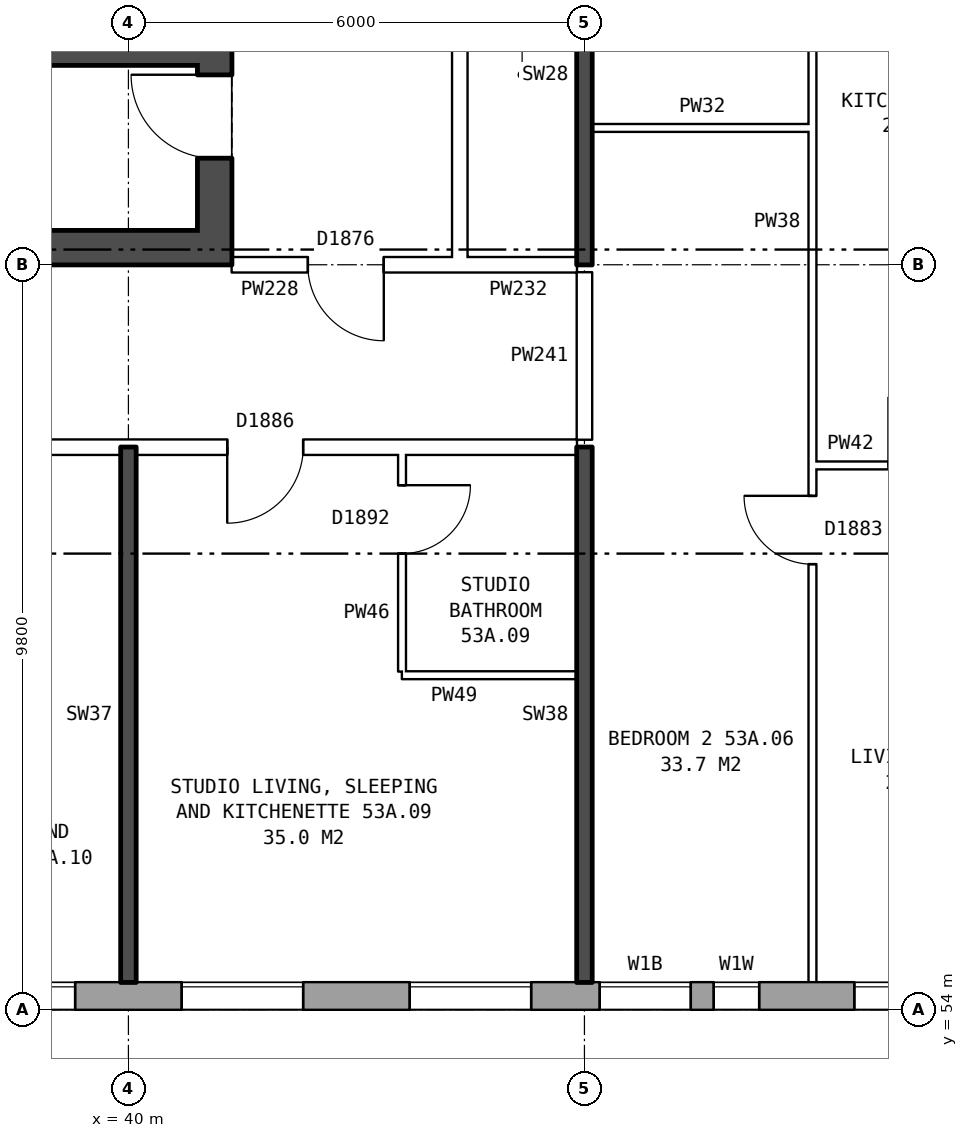
"""IFC4 building model, lengths in metres.
Left out: names, types, materials, properties, quantities, classifications, styles, units other than length and angle.
Written with IfcOpenShell. Run it as: python <this file> out.ifc"""

import sys

from ifc_helpers import new_model, si_unit, direction, frame, frame_2d, origin, place, context, subcontext, project, spatial, rectangle, extrude, element, fill, save


model = new_model("IFC4")
c1 = context("Model", 3, precision=1e-05, world=origin(), true_north=direction((0.0, 1.0)))
c2 = subcontext(c1, "Body", "Model", "MODEL_VIEW")
j1 = project(units=[si_unit("LENGTHUNIT", "METRE"), si_unit("PLANEANGLEUNIT", "RADIAN")], contexts=[c1])
p1 = place(None, origin())
s1 = spatial("IfcSite", under=j1, at=p1, CompositionType="ELEMENT")
p2 = place(p1, origin())
s2 = spatial("IfcBuilding", under=s1, at=p2, CompositionType="ELEMENT")
p3 = place(p2, frame((0.0, 0.0, 188.2)))
s3 = spatial("IfcBuildingStorey", under=s2, at=p3, CompositionType="ELEMENT", Elevation=188.2)
p4 = place(p3, frame((33.325, 54.18, 0.0), z_axis=(0.0, 0.0, 1.0), x_axis=(1.0, 0.0, 0.0)))
e1 = element("IfcWall", 1, at=p4, inside=s3, PredefinedType="STANDARD", context=c2, shape_type="SweptSolid", body=[
    extrude(rectangle(XDim=39.601, YDim=0.36, at=frame_2d((19.8, 0.0))), origin(), (0.0, 0.0, 1.0), 2.85),
])
p5 = place(p4, frame((1.375, 0.0, 0.8)))
e2 = element("IfcOpeningElement", 2, at=p5, cuts=e1, PredefinedType="OPENING", context=c2, shape_type="SweptSolid", body=[
    extrude(rectangle(XDim=1.6, YDim=1.8, at=frame_2d((0.8, 0.9))), frame((0.0, 0.19, 0.0), z_axis=(0.0, -1.0, 0.0), x_axis=(1.0, 0.0, 0.0)), (0.0, 0.0, 1.0), 0.38),
])
p6 = place(p4, frame((4.375, 0.0, 0.8)))
e3 = element("IfcOpeningElement", 3, at=p6, cuts=e1, PredefinedType="OPENING", context=c2, shape_type="SweptSolid", body=[
    extrude(rectangle(XDim=1.6, YDim=1.8, at=frame_2d((0.8, 0.9))), frame((0.0, 0.19, 0.0), z_axis=(0.0, -1.0, 0.0), x_axis=(1.0, 0.0, 0.0)), (0.0, 0.0, 1.0), 0.38),
])
p7 = place(p4, frame((7.375, 0.0, 0.8)))
e4 = element("IfcOpeningElement", 4, at=p7, cuts=e1, PredefinedType="OPENING", context=c2, shape_type="SweptSolid", body=[
    extrude(rectangle(XDim=1.6, YDim=1.8, at=frame_2d((0.8, 0.9))), frame((0.0, 0.19, 0.0), z_axis=(0.0, -1.0, 0.0), x_axis=(1.0, 0.0, 0.0)), (0.0, 0.0, 1.0), 0.38),
])
p8 = place(p4, frame((10.375, 0.0, 0.8)))
e5 = element("IfcOpeningElement", 5, at=p8, cuts=e1, PredefinedType="OPENING", context=c2, shape_type="SweptSolid", body=[
    extrude(rectangle(XDim=1.6, YDim=1.8, at=frame_2d((0.8, 0.9))), frame((0.0, 0.19, 0.0), z_axis=(0.0, -1.0, 0.0), x_axis=(1.0, 0.0, 0.0)), (0.0, 0.0, 1.0), 0.38),
])
p9 = place(p4, frame((12.875, 0.0, 0.8)))
e6 = element("IfcOpeningElement", 6, at=p9, cuts=e1, PredefinedType="OPENING", context=c2, shape_type="SweptSolid", body=[
    extrude(rectangle(XDim=1.2, YDim=1.8, at=frame_2d((0.6, 0.9))), frame((0.0, 0.19, 0.0), z_axis=(0.0, -1.0, 0.0), x_axis=(1.0, 0.0, 0.0)), (0.0, 0.0, 1.0), 0.38),
])
p10 = place(p4, frame((16.225, 0.0, 0.8)))
e7 = element("IfcOpeningElement", 7, at=p10, cuts=e1, PredefinedType="OPENING", context=c2, shape_type="SweptSolid", body=[
    extrude(rectangle(XDim=0.6, YDim=0.9, at=frame_2d((0.3, 0.45))), frame((0.0, 0.19, 0.0), z_axis=(0.0, -1.0, 0.0), x_axis=(1.0, 0.0, 0.0)), (0.0, 0.0, 1.0), 0.38),
])
p11 = place(p4, frame((19.375, 0.0, 0.8)))
e8 = element("IfcOpeningElement", 8, at=p11, cuts=e1, PredefinedType="OPENING", context=c2, shape_type="SweptSolid", body=[
    extrude(rectangle(XDim=1.6, YDim=1.8, at=frame_2d((0.8, 0.9))), frame((0.0, 0.19, 0.0), z_axis=(0.0, -1.0, 0.0), x_axis=(1.0, 0.0, 0.0)), (0.0, 0.0, 1.0), 0.38),
])
p12 = place(p4, frame((21.875, 0.0, 0.15)))
e9 = element("IfcOpeningElement", 9, at=p12, cuts=e1, PredefinedType="OPENING", context=c2, shape_type="SweptSolid", body=[
    extrude(rectangle(XDim=1.2, YDim=1.8, at=frame_2d((0.6, 0.9))), frame((0.0, 0.19, 0.0), z_axis=(0.0, -1.0, 0.0), x_axis=(1.0, 0.0, 0.0)), (0.0, 0.0, 1.0), 0.38),
])
p13 = place(p4, frame((25.375, 0.0, 0.8)))
e10 = element("IfcOpeningElement", 10, at=p13, cuts=e1, PredefinedType="OPENING", context=c2, shape_type="SweptSolid", body=[
    extrude(rectangle(XDim=1.6, YDim=1.8, at=frame_2d((0.8, 0.9))), frame((0.0, 0.19, 0.0), z_axis=(0.0, -1.0, 0.0), x_axis=(1.0, 0.0, 0.0)), (0.0, 0.0, 1.0), 0.38),
])
p14 = place(p4, frame((28.375, 0.0, 0.8)))
e11 = element("IfcOpeningElement", 11, at=p14, cuts=e1, PredefinedType="OPENING", context=c2, shape_type="SweptSolid", body=[
    extrude(rectangle(XDim=1.6, YDim=1.8, at=frame_2d((0.8, 0.9))), frame((0.0, 0.19, 0.0), z_axis=(0.0, -1.0, 0.0), x_axis=(1.0, 0.0, 0.0)), (0.0, 0.0, 1.0), 0.38),
])
p15 = place(p4, frame((31.375, 0.0, 0.8)))
e12 = element("IfcOpeningElement", 12, at=p15, cuts=e1, PredefinedType="OPENING", context=c2, shape_type="SweptSolid", body=[
    extrude(rectangle(XDim=1.6, YDim=1.8, at=frame_2d((0.8, 0.9))), frame((0.0, 0.19, 0.0), z_axis=(0.0, -1.0, 0.0), x_axis=(1.0, 0.0, 0.0)), (0.0, 0.0, 1.0), 0.38),
])
p16 = place(p4, frame((34.375, 0.0, 0.8)))
e13 = element("IfcOpeningElement", 13, at=p16, cuts=e1, PredefinedType="OPENING", context=c2, shape_type="SweptSolid", body=[
    extrude(rectangle(XDim=1.6, YDim=1.8, at=frame_2d((0.8, 0.9))), frame((0.0, 0.19, 0.0), z_axis=(0.0, -1.0, 0.0), x_axis=(1.0, 0.0, 0.0)), (0.0, 0.0, 1.0), 0.38),
])
p17 = place(p4, frame((37.375, 0.0, 0.8)))
e14 = element("IfcOpeningElement", 14, at=p17, cuts=e1, PredefinedType="OPENING", context=c2, shape_type="SweptSolid", body=[
    extrude(rectangle(XDim=1.6, YDim=1.8, at=frame_2d((0.8, 0.9))), frame((0.0, 0.19, 0.0), z_axis=(0.0, -1.0, 0.0), x_axis=(1.0, 0.0, 0.0)), (0.0, 0.0, 1.0), 0.38),
])
p18 = place(p4, frame((14.375, 0.0, 1.6)))
e15 = element("IfcOpeningElement", 15, at=p18, cuts=e1, PredefinedType="OPENING", context=c2, shape_type="SweptSolid", body=[
    extrude(rectangle(XDim=0.6, YDim=0.9, at=frame_2d((0.3, 0.45))), frame((0.0, 0.19, 0.0), z_axis=(0.0, -1.0, 0.0), x_axis=(1.0, 0.0, 0.0)), (0.0, 0.0, 1.0), 0.38),
])
p19 = place(p4, frame((17.125, 0.0, 0.8)))
e16 = element("IfcOpeningElement", 16, at=p19, cuts=e1, PredefinedType="OPENING", context=c2, shape_type="SweptSolid", body=[
    extrude(rectangle(XDim=1.2, YDim=1.8, at=frame_2d((0.6, 0.9))), frame((0.0, 0.19, 0.0), z_axis=(0.0, -1.0, 0.0), x_axis=(1.0, 0.0, 0.0)), (0.0, 0.0, 1.0), 0.38),
])
p20 = place(p4, frame((23.375, 0.0, 0.15)))
e17 = element("IfcOpeningElement", 17, at=p20, cuts=e1, PredefinedType="OPENING", context=c2, shape_type="SweptSolid", body=[
    extrude(rectangle(XDim=0.6, YDim=0.9, at=frame_2d((0.3, 0.45))), frame((0.0, 0.19, 0.0), z_axis=(0.0, -1.0, 0.0), x_axis=(1.0, 0.0, 0.0)), (0.0, 0.0, 1.0), 0.38),
])
p21 = place(p3, frame((41.135, 76.2, 0.0), z_axis=(0.0, 0.0, 1.0), x_axis=(0.0, -1.0, 0.0)))
e18 = element("IfcWall", 18, at=p21, inside=s3, PredefinedType="SHEAR", context=c2, shape_type="SweptSolid", body=[
    extrude(rectangle(XDim=12.4, YDim=0.45, at=frame_2d((6.2, 0.0))), origin(), (0.0, 0.0, 1.0), 2.85),
])
p22 = place(p21, frame((1.325, 0.0, 0.0)))
e19 = element("IfcOpeningElement", 19, at=p22, cuts=e18, PredefinedType="OPENING", context=c2, shape_type="SweptSolid", body=[
    extrude(rectangle(XDim=1.1, YDim=2.1, at=frame_2d((0.55, 1.05))), frame((0.0, 0.235, 0.0), z_axis=(0.0, -1.0, 0.0), x_axis=(1.0, 0.0, 0.0)), (0.0, 0.0, 1.0), 0.47),
])
p23 = place(p21, frame((4.575, 0.0, 0.0)))
e20 = element("IfcOpeningElement", 20, at=p23, cuts=e18, PredefinedType="OPENING", context=c2, shape_type="SweptSolid", body=[
    extrude(rectangle(XDim=0.85, YDim=2.1, at=frame_2d((0.425, 1.05))), frame((0.0, 0.235, 0.0), z_axis=(0.0, -1.0, 0.0), x_axis=(1.0, 0.0, 0.0)), (0.0, 0.0, 1.0), 0.47),
])
p24 = place(p21, frame((7.825, 0.0, 0.0)))
e21 = element("IfcOpeningElement", 21, at=p24, cuts=e18, PredefinedType="OPENING", context=c2, shape_type="SweptSolid", body=[
    extrude(rectangle(XDim=0.85, YDim=2.1, at=frame_2d((0.425, 1.05))), frame((0.0, 0.235, 0.0), z_axis=(0.0, -1.0, 0.0), x_axis=(1.0, 0.0, 0.0)), (0.0, 0.0, 1.0), 0.47),
])
p25 = place(p21, frame((9.9, 0.0, 0.0)))
e22 = element("IfcOpeningElement", 22, at=p25, cuts=e18, PredefinedType="OPENING", context=c2, shape_type="SweptSolid", body=[
    extrude(rectangle(XDim=1.1, YDim=2.1, at=frame_2d((0.55, 1.05))), frame((0.0, 0.235, 0.0), z_axis=(0.0, -1.0, 0.0), x_axis=(1.0, 0.0, 0.0)), (0.0, 0.0, 1.0), 0.47),
])
p26 = place(p3, frame((40.91, 64.025, 0.0), z_axis=(0.0, 0.0, 1.0), x_axis=(-1.0, 0.0, 0.0)))
e23 = element("IfcWall", 23, at=p26, inside=s3, PredefinedType="SHEAR", context=c2, shape_type="SweptSolid", body=[
    extrude(rectangle(XDim=8.1, YDim=0.45, at=frame_2d((4.05, 0.0))), origin(), (0.0, 0.0, 1.0), 2.85),
])
p27 = place(p3, frame((40.91, 66.55, 0.0), z_axis=(0.0, 0.0, 1.0), x_axis=(-1.0, 0.0, 0.0)))
e24 = element("IfcWall", 24, at=p27, inside=s3, PredefinedType="SHEAR", context=c2, shape_type="SweptSolid", body=[
    extrude(rectangle(XDim=2.475, YDim=0.25, at=frame_2d((1.237, 0.0))), origin(), (0.0, 0.0, 1.0), 2.85),
])
p28 = place(p3, frame((44.36, 63.9, 0.0), z_axis=(0.0, 0.0, 1.0), x_axis=(0.0, 1.0, 0.0)))
e25 = element("IfcWall", 25, at=p28, inside=s3, PredefinedType="PARTITIONING", context=c2, shape_type="SweptSolid", body=[
    extrude(rectangle(XDim=12.2, YDim=0.2, at=frame_2d((6.1, 0.0))), origin(), (0.0, 0.0, 1.0), 2.85),
])
p29 = place(p28, frame((5.1, 0.0, 0.0)))
e26 = element("IfcOpeningElement", 26, at=p29, cuts=e25, PredefinedType="OPENING", context=c2, shape_type="SweptSolid", body=[
    extrude(rectangle(XDim=2.0, YDim=2.1, at=frame_2d((1.0, 1.05))), frame((0.0, 0.11, 0.0), z_axis=(0.0, -1.0, 0.0), x_axis=(1.0, 0.0, 0.0)), (0.0, 0.0, 1.0), 0.22),
])
p30 = place(p3, frame((43.6, 58.4, 0.0), z_axis=(0.0, 0.0, 1.0), x_axis=(1.0, 0.0, 0.0)))
e27 = element("IfcWall", 27, at=p30, inside=s3, PredefinedType="PARTITIONING", context=c2, shape_type="SweptSolid", body=[
    extrude(rectangle(XDim=2.3, YDim=0.1, at=frame_2d((1.15, 0.0))), origin(), (0.0, 0.0, 1.0), 2.85),
])
p31 = place(p3, frame((49.0, 61.16, 0.0), z_axis=(0.0, 0.0, 1.0), x_axis=(1.0, 0.0, 0.0)))
e28 = element("IfcWall", 28, at=p31, inside=s3, PredefinedType="PARTITIONING", context=c2, shape_type="SweptSolid", body=[
    extrude(rectangle(XDim=2.9, YDim=0.1, at=frame_2d((1.45, 0.0))), origin(), (0.0, 0.0, 1.0), 2.85),
])
p32 = place(p31, frame((1.0, 0.0, 0.0)))
e29 = element("IfcOpeningElement", 29, at=p32, cuts=e28, PredefinedType="OPENING", context=c2, shape_type="SweptSolid", body=[
    extrude(rectangle(XDim=0.9, YDim=2.1, at=frame_2d((0.45, 1.05))), frame((0.0, 0.06, 0.0), z_axis=(0.0, -1.0, 0.0), x_axis=(1.0, 0.0, 0.0)), (0.0, 0.0, 1.0), 0.12),
])
p33 = place(p3, frame((30.61, 61.4, 0.0), z_axis=(0.0, 0.0, 1.0), x_axis=(1.0, 0.0, 0.0)))
e30 = element("IfcWall", 30, at=p33, inside=s3, PredefinedType="PARTITIONING", context=c2, shape_type="SweptSolid", body=[
    extrude(rectangle(XDim=15.29, YDim=0.2, at=frame_2d((7.645, 0.0))), origin(), (0.0, 0.0, 1.0), 2.85),
])
p34 = place(p33, frame((10.69, 0.0, 0.0)))
e31 = element("IfcOpeningElement", 31, at=p34, cuts=e30, PredefinedType="OPENING", context=c2, shape_type="SweptSolid", body=[
    extrude(rectangle(XDim=1.0, YDim=2.1, at=frame_2d((0.5, 1.05))), frame((0.0, 0.11, 0.0), z_axis=(0.0, -1.0, 0.0), x_axis=(1.0, 0.0, 0.0)), (0.0, 0.0, 1.0), 0.22),
])
p35 = place(p33, frame((5.89, 0.0, 0.0)))
e32 = element("IfcOpeningElement", 32, at=p35, cuts=e30, PredefinedType="OPENING", context=c2, shape_type="SweptSolid", body=[
    extrude(rectangle(XDim=1.0, YDim=2.1, at=frame_2d((0.5, 1.05))), frame((0.0, 0.11, 0.0), z_axis=(0.0, -1.0, 0.0), x_axis=(1.0, 0.0, 0.0)), (0.0, 0.0, 1.0), 0.22),
])
p36 = place(p3, frame((41.36, 63.8, 0.0), z_axis=(0.0, 0.0, 1.0), x_axis=(1.0, 0.0, 0.0)))
e33 = element("IfcWall", 33, at=p36, inside=s3, PredefinedType="PARTITIONING", context=c2, shape_type="SweptSolid", body=[
    extrude(rectangle(XDim=3.0, YDim=0.2, at=frame_2d((1.5, 0.0))), origin(), (0.0, 0.0, 1.0), 2.85),
])
p37 = place(p36, frame((1.0, 0.0, 0.0)))
e34 = element("IfcOpeningElement", 34, at=p37, cuts=e33, PredefinedType="OPENING", context=c2, shape_type="SweptSolid", body=[
    extrude(rectangle(XDim=1.0, YDim=2.1, at=frame_2d((0.5, 1.05))), frame((0.0, 0.11, 0.0), z_axis=(0.0, -1.0, 0.0), x_axis=(1.0, 0.0, 0.0)), (0.0, 0.0, 1.0), 0.22),
])
p38 = place(p3, frame((44.36, 63.8, 0.0), z_axis=(0.0, 0.0, 1.0), x_axis=(1.0, 0.0, 0.0)))
e35 = element("IfcWall", 35, at=p38, inside=s3, PredefinedType="PARTITIONING", context=c2, shape_type="SweptSolid", body=[
    extrude(rectangle(XDim=1.54, YDim=0.2, at=frame_2d((0.77, 0.0))), origin(), (0.0, 0.0, 1.0), 2.85),
])
p39 = place(p3, frame((46.1, 65.6, 0.0), z_axis=(0.0, 0.0, 1.0), x_axis=(1.0, 0.0, 0.0)))
e36 = element("IfcWall", 36, at=p39, inside=s3, PredefinedType="PARTITIONING", context=c2, shape_type="SweptSolid", body=[
    extrude(rectangle(XDim=2.9, YDim=0.1, at=frame_2d((1.45, 0.0))), origin(), (0.0, 0.0, 1.0), 2.85),
])
p40 = place(p3, frame((40.0, 54.36, 0.0), z_axis=(0.0, 0.0, 1.0), x_axis=(0.0, 1.0, 0.0)))
e37 = element("IfcWall", 37, at=p40, inside=s3, PredefinedType="SOLIDWALL", context=c2, shape_type="SweptSolid", body=[
    extrude(rectangle(XDim=7.04, YDim=0.2, at=frame_2d((3.52, 0.0))), origin(), (0.0, 0.0, 1.0), 2.85),
])
p41 = place(p3, frame((43.6, 58.45, 0.0), z_axis=(0.0, 0.0, 1.0), x_axis=(0.0, 1.0, 0.0)))
e38 = element("IfcWall", 38, at=p41, inside=s3, PredefinedType="PARTITIONING", context=c2, shape_type="SweptSolid", body=[
    extrude(rectangle(XDim=2.85, YDim=0.1, at=frame_2d((1.425, 0.0))), origin(), (0.0, 0.0, 1.0), 2.85),
])
p42 = place(p41, frame((1.55, 0.0, 0.0)))
e39 = element("IfcOpeningElement", 39, at=p42, cuts=e38, PredefinedType="OPENING", context=c2, shape_type="SweptSolid", body=[
    extrude(rectangle(XDim=0.9, YDim=2.1, at=frame_2d((0.45, 1.05))), frame((0.0, 0.06, 0.0), z_axis=(0.0, -1.0, 0.0), x_axis=(1.0, 0.0, 0.0)), (0.0, 0.0, 1.0), 0.12),
])
p43 = place(p3, frame((46.0, 54.36, 0.0), z_axis=(0.0, 0.0, 1.0), x_axis=(0.0, 1.0, 0.0)))
e40 = element("IfcWall", 40, at=p43, inside=s3, PredefinedType="SOLIDWALL", context=c2, shape_type="SweptSolid", body=[
    extrude(rectangle(XDim=7.04, YDim=0.2, at=frame_2d((3.52, 0.0))), origin(), (0.0, 0.0, 1.0), 2.85),
])
p44 = place(p3, frame((46.0, 61.5, 0.0), z_axis=(0.0, 0.0, 1.0), x_axis=(0.0, 1.0, 0.0)))
e41 = element("IfcWall", 41, at=p44, inside=s3, PredefinedType="PARTITIONING", context=c2, shape_type="SweptSolid", body=[
    extrude(rectangle(XDim=2.2, YDim=0.2, at=frame_2d((1.1, 0.0))), origin(), (0.0, 0.0, 1.0), 2.85),
])
p45 = place(p3, frame((46.0, 63.8, 0.0), z_axis=(0.0, 0.0, 1.0), x_axis=(0.0, 1.0, 0.0)))
e42 = element("IfcWall", 42, at=p45, inside=s3, PredefinedType="SOLIDWALL", context=c2, shape_type="SweptSolid", body=[
    extrude(rectangle(XDim=5.0, YDim=0.2, at=frame_2d((2.5, 0.0))), origin(), (0.0, 0.0, 1.0), 2.85),
])
p46 = place(p3, frame((49.0, 54.36, 0.0), z_axis=(0.0, 0.0, 1.0), x_axis=(0.0, 1.0, 0.0)))
e43 = element("IfcWall", 43, at=p46, inside=s3, PredefinedType="PARTITIONING", context=c2, shape_type="SweptSolid", body=[
    extrude(rectangle(XDim=14.34, YDim=0.1, at=frame_2d((7.17, 0.0))), origin(), (0.0, 0.0, 1.0), 2.85),
])
p47 = place(p46, frame((5.5, 0.0, 0.0)))
e44 = element("IfcOpeningElement", 44, at=p47, cuts=e43, PredefinedType="OPENING", context=c2, shape_type="SweptSolid", body=[
    extrude(rectangle(XDim=0.9, YDim=2.1, at=frame_2d((0.45, 1.05))), frame((0.0, 0.06, 0.0), z_axis=(0.0, -1.0, 0.0), x_axis=(1.0, 0.0, 0.0)), (0.0, 0.0, 1.0), 0.12),
])
p48 = place(p46, frame((13.04, 0.0, 0.0)))
e45 = element("IfcOpeningElement", 45, at=p48, cuts=e43, PredefinedType="OPENING", context=c2, shape_type="SweptSolid", body=[
    extrude(rectangle(XDim=0.9, YDim=2.1, at=frame_2d((0.45, 1.05))), frame((0.0, 0.06, 0.0), z_axis=(0.0, -1.0, 0.0), x_axis=(1.0, 0.0, 0.0)), (0.0, 0.0, 1.0), 0.12),
])
p49 = place(p6, origin())
e46 = element("IfcWindow", 46, at=p49, inside=s3, PartitioningType="SINGLE_PANEL", PredefinedType="WINDOW", context=c2, shape_type="SweptSolid", body=[
    extrude(rectangle(XDim=1.6, YDim=1.8, at=frame_2d((0.8, 0.9))), frame((0.0, 0.15, 0.0), z_axis=(0.0, -1.0, 0.0), x_axis=(1.0, 0.0, 0.0)), (0.0, 0.0, 1.0), 0.06),
])
fill(e3, e46)
p50 = place(p7, origin())
e47 = element("IfcWindow", 47, at=p50, inside=s3, PartitioningType="SINGLE_PANEL", PredefinedType="WINDOW", context=c2, shape_type="SweptSolid", body=[
    extrude(rectangle(XDim=1.6, YDim=1.8, at=frame_2d((0.8, 0.9))), frame((0.0, 0.15, 0.0), z_axis=(0.0, -1.0, 0.0), x_axis=(1.0, 0.0, 0.0)), (0.0, 0.0, 1.0), 0.06),
])
fill(e4, e47)
p51 = place(p8, origin())
e48 = element("IfcWindow", 48, at=p51, inside=s3, PartitioningType="SINGLE_PANEL", PredefinedType="WINDOW", context=c2, shape_type="SweptSolid", body=[
    extrude(rectangle(XDim=1.6, YDim=1.8, at=frame_2d((0.8, 0.9))), frame((0.0, 0.15, 0.0), z_axis=(0.0, -1.0, 0.0), x_axis=(1.0, 0.0, 0.0)), (0.0, 0.0, 1.0), 0.06),
])
fill(e5, e48)
p52 = place(p9, origin())
e49 = element("IfcWindow", 49, at=p52, inside=s3, PartitioningType="SINGLE_PANEL", PredefinedType="WINDOW", context=c2, shape_type="SweptSolid", body=[
    extrude(rectangle(XDim=1.2, YDim=1.8, at=frame_2d((0.6, 0.9))), frame((0.0, 0.15, 0.0), z_axis=(0.0, -1.0, 0.0), x_axis=(1.0, 0.0, 0.0)), (0.0, 0.0, 1.0), 0.06),
])
fill(e6, e49)
p53 = place(p10, origin())
e50 = element("IfcWindow", 50, at=p53, inside=s3, PartitioningType="SINGLE_PANEL", PredefinedType="WINDOW", context=c2, shape_type="SweptSolid", body=[
    extrude(rectangle(XDim=0.6, YDim=0.9, at=frame_2d((0.3, 0.45))), frame((0.0, 0.15, 0.0), z_axis=(0.0, -1.0, 0.0), x_axis=(1.0, 0.0, 0.0)), (0.0, 0.0, 1.0), 0.06),
])
fill(e7, e50)
p54 = place(p25, frame((1.1, 0.0, 0.0), z_axis=(0.0, 0.0, 1.0), x_axis=(-1.0, 0.0, 0.0)))
e51 = element("IfcDoor", 51, at=p54, inside=s3, OperationType="SINGLE_SWING_RIGHT", PredefinedType="DOOR", context=c2, shape_type="SweptSolid", body=[
    extrude(rectangle(XDim=1.1, YDim=2.1, at=frame_2d((0.55, 1.05))), frame((0.0, 0.21, 0.0), z_axis=(0.0, -1.0, 0.0), x_axis=(1.0, 0.0, 0.0)), (0.0, 0.0, 1.0), 0.05),
])
fill(e22, e51)
p55 = place(p37, frame((1.0, 0.0, 0.0), z_axis=(0.0, 0.0, 1.0), x_axis=(-1.0, 0.0, 0.0)))
e52 = element("IfcDoor", 52, at=p55, inside=s3, OperationType="SINGLE_SWING_LEFT", PredefinedType="DOOR", context=c2, shape_type="SweptSolid", body=[
    extrude(rectangle(XDim=1.0, YDim=2.1, at=frame_2d((0.5, 1.05))), frame((0.0, 0.025, 0.0), z_axis=(0.0, -1.0, 0.0), x_axis=(1.0, 0.0, 0.0)), (0.0, 0.0, 1.0), 0.05),
])
fill(e34, e52)
p56 = place(p47, origin())
e53 = element("IfcDoor", 53, at=p56, inside=s3, OperationType="SINGLE_SWING_RIGHT", PredefinedType="DOOR", context=c2, shape_type="SweptSolid", body=[
    extrude(rectangle(XDim=0.9, YDim=2.1, at=frame_2d((0.45, 1.05))), frame((0.0, 0.025, 0.0), z_axis=(0.0, -1.0, 0.0), x_axis=(1.0, 0.0, 0.0)), (0.0, 0.0, 1.0), 0.05),
])
fill(e44, e53)
p57 = place(p34, frame((1.0, 0.0, 0.0), z_axis=(0.0, 0.0, 1.0), x_axis=(-1.0, 0.0, 0.0)))
e54 = element("IfcDoor", 54, at=p57, inside=s3, OperationType="SINGLE_SWING_RIGHT", PredefinedType="DOOR", context=c2, shape_type="SweptSolid", body=[
    extrude(rectangle(XDim=1.0, YDim=2.1, at=frame_2d((0.5, 1.05))), frame((0.0, 0.025, 0.0), z_axis=(0.0, -1.0, 0.0), x_axis=(1.0, 0.0, 0.0)), (0.0, 0.0, 1.0), 0.05),
])
fill(e31, e54)
p58 = place(p42, frame((0.9, 0.0, 0.0), z_axis=(0.0, 0.0, 1.0), x_axis=(-1.0, 0.0, 0.0)))
e55 = element("IfcDoor", 55, at=p58, inside=s3, OperationType="SINGLE_SWING_LEFT", PredefinedType="DOOR", context=c2, shape_type="SweptSolid", body=[
    extrude(rectangle(XDim=0.9, YDim=2.1, at=frame_2d((0.45, 1.05))), frame((0.0, 0.025, 0.0), z_axis=(0.0, -1.0, 0.0), x_axis=(1.0, 0.0, 0.0)), (0.0, 0.0, 1.0), 0.05),
])
fill(e39, e55)
p59 = place(p18, origin())
e56 = element("IfcWindow", 56, at=p59, inside=s3, PartitioningType="SINGLE_PANEL", PredefinedType="WINDOW", context=c2, shape_type="SweptSolid", body=[
    extrude(rectangle(XDim=0.6, YDim=0.9, at=frame_2d((0.3, 0.45))), frame((0.0, 0.15, 0.0), z_axis=(0.0, -1.0, 0.0), x_axis=(1.0, 0.0, 0.0)), (0.0, 0.0, 1.0), 0.06),
])
fill(e15, e56)
save(model, sys.argv[1])
